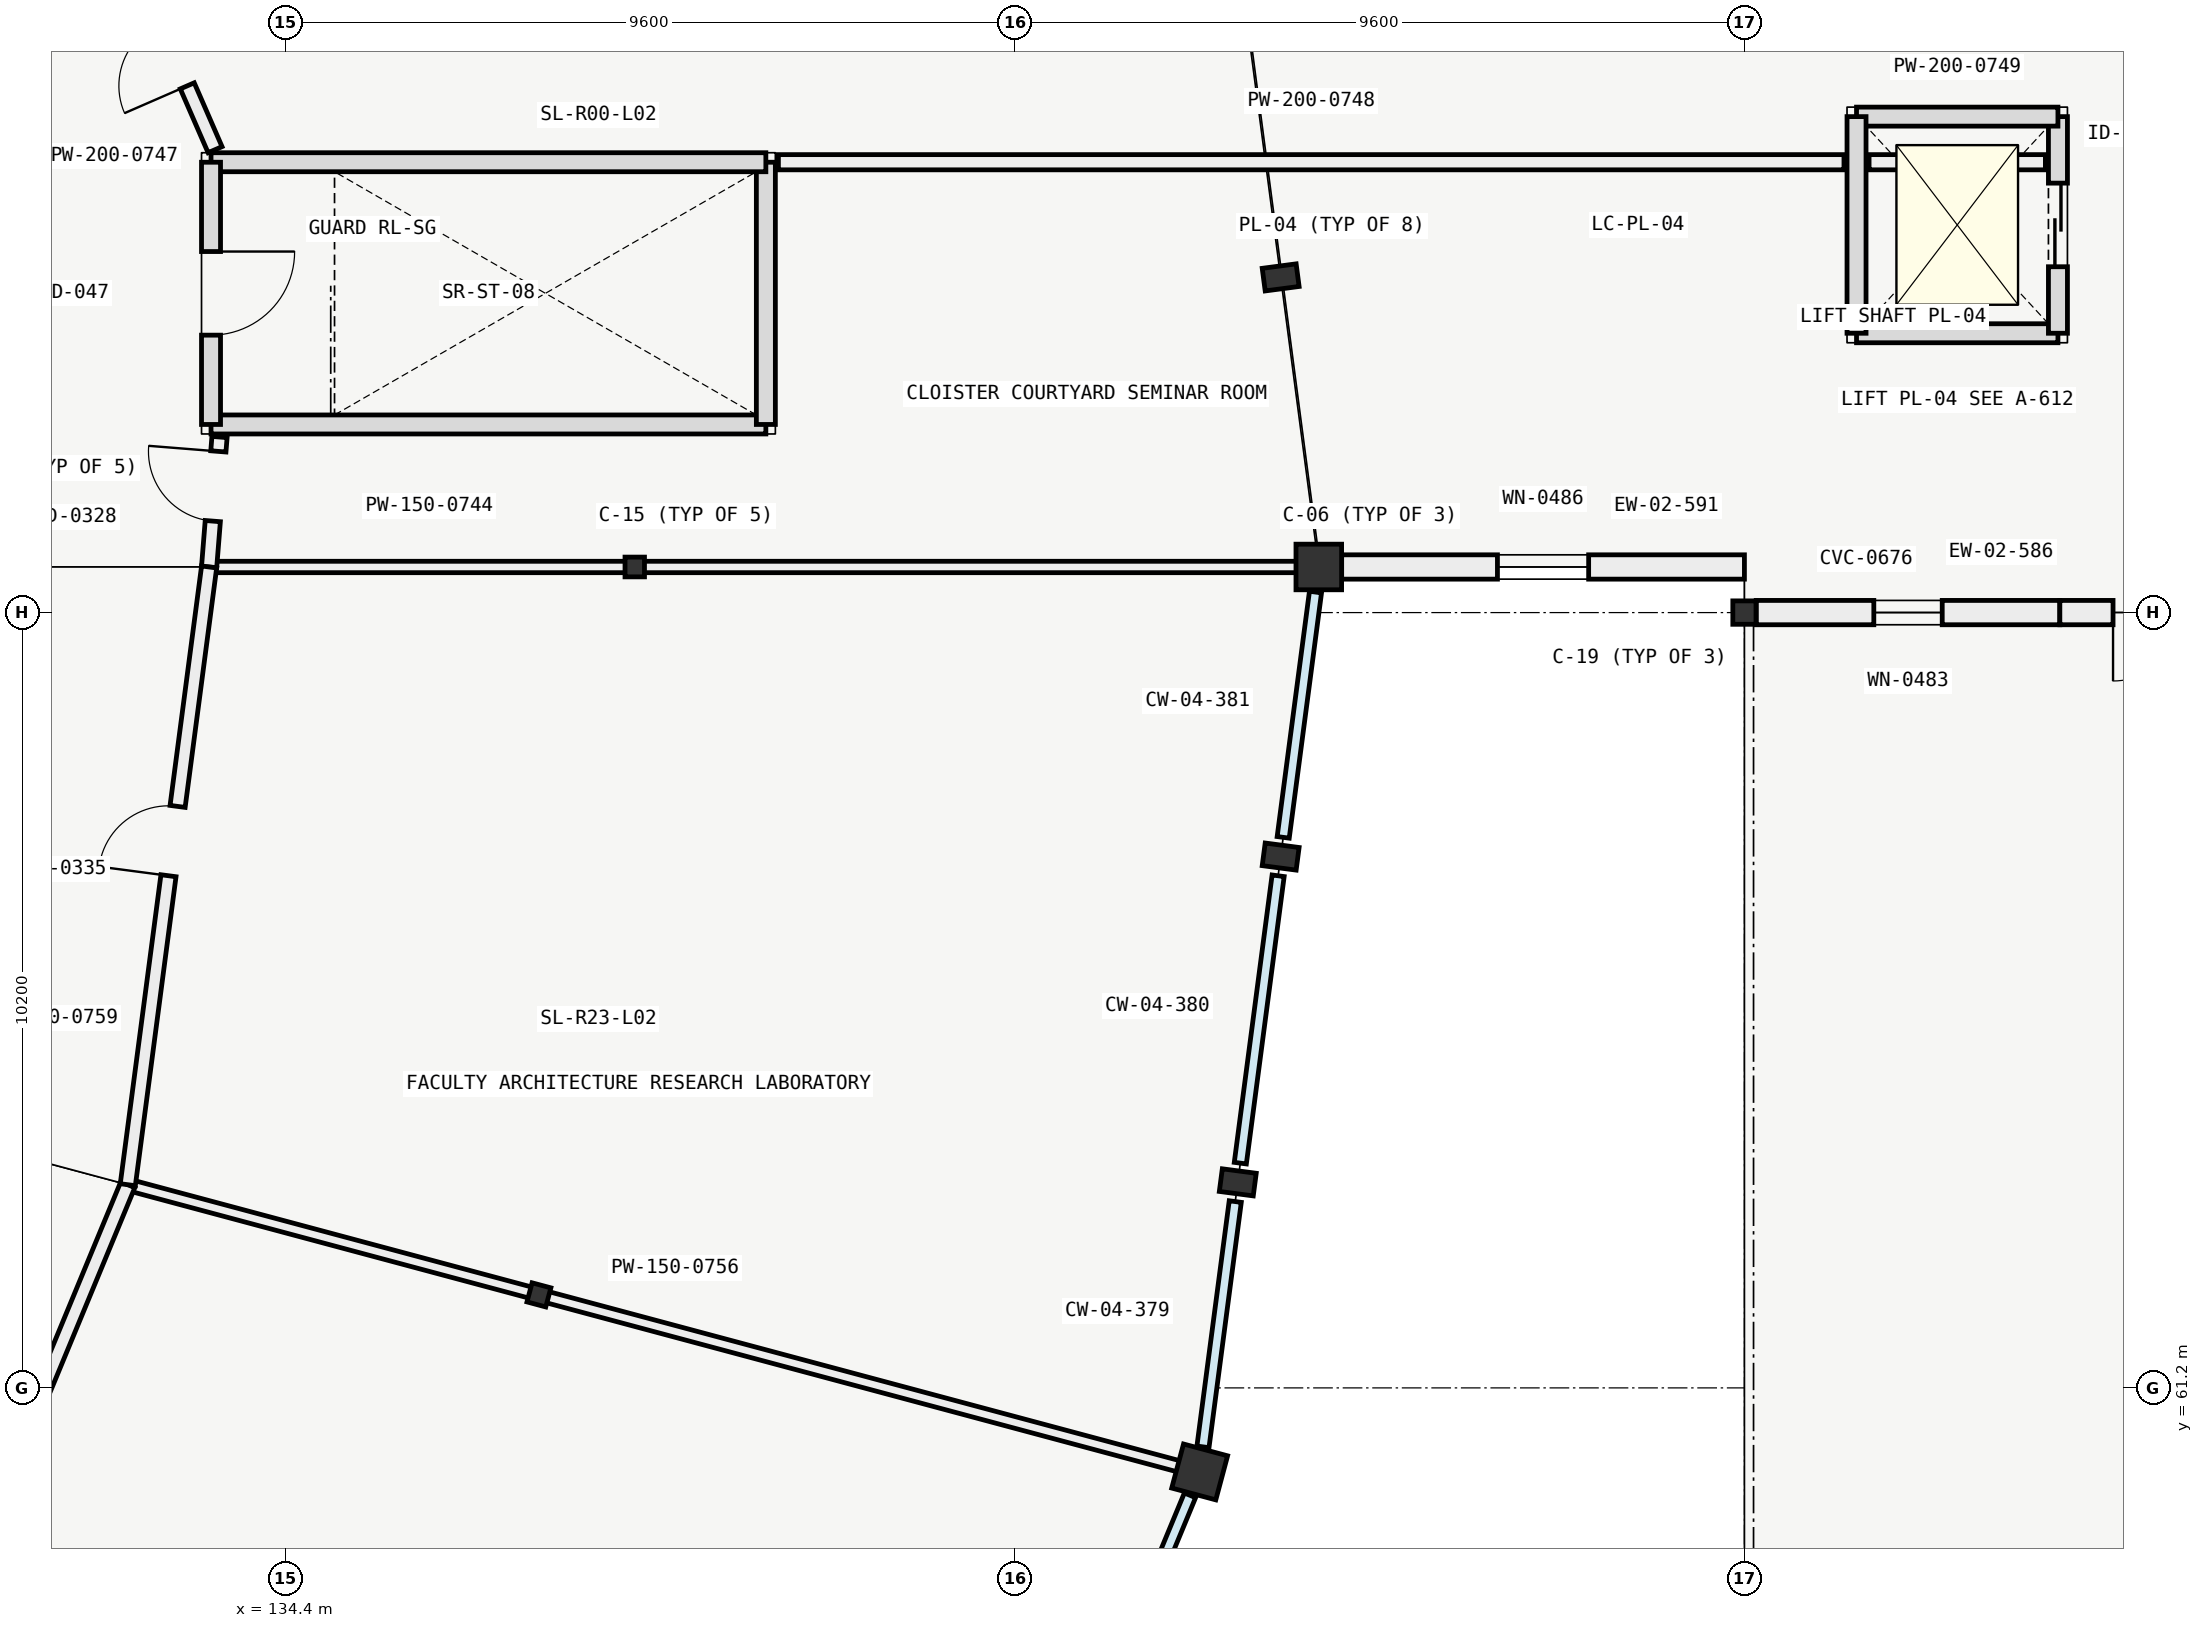
"""IFC4 building model, lengths in metres.
Left out: names, types, materials, properties, quantities, classifications, styles, units other than length and angle.
Written with IfcOpenShell. Run it as: python <this file> out.ifc"""

import sys

from ifc_helpers import new_model, si_unit, direction, frame, frame_2d, origin, origin_2d, place, context, subcontext, project, spatial, rectangle, i_section, extrude, element, fill, save


model = new_model("IFC4")
c1 = context("Model", 3, precision=1e-05, world=origin(), true_north=direction((0.0, 1.0)))
c2 = subcontext(c1, "Body", "Model", "MODEL_VIEW")
j1 = project(units=[si_unit("LENGTHUNIT", "METRE"), si_unit("PLANEANGLEUNIT", "RADIAN")], contexts=[c1])
p1 = place(None, origin())
s1 = spatial("IfcSite", under=j1, at=p1, CompositionType="ELEMENT")
p2 = place(p1, origin())
s2 = spatial("IfcBuilding", under=s1, at=p2, CompositionType="ELEMENT")
p3 = place(p2, frame((0.0, 0.0, 9.6)))
s3 = spatial("IfcBuildingStorey", under=s2, at=p3, CompositionType="ELEMENT", Elevation=9.6)
p4 = place(p3, frame((139.0, 72.0, 0.0), z_axis=(0.0, 0.0, 1.0), x_axis=(1.0, 0.0, 0.0)))
e1 = element("IfcColumn", 1, at=p4, inside=s3, PredefinedType="COLUMN", context=c2, shape_type="SweptSolid", body=[
    extrude(i_section(OverallWidth=0.256, OverallDepth=0.26, WebThickness=0.01, FlangeThickness=0.017, FilletRadius=0.014, at=origin_2d()), origin(), (0.0, 0.0, 1.0), 4.2),
])
p5 = place(p3, frame((148.0, 72.0, 0.0), z_axis=(0.0, 0.0, 1.0), x_axis=(1.0, 0.0, 0.0)))
e2 = element("IfcColumn", 2, at=p5, inside=s3, PredefinedType="COLUMN", context=c2, shape_type="SweptSolid", body=[
    extrude(rectangle(XDim=0.6, YDim=0.6, at=origin_2d()), origin(), (0.0, 0.0, 1.0), 4.2),
])
p6 = place(p3, frame((137.739, 62.424, 0.0), z_axis=(0.0, 0.0, 1.0), x_axis=(-0.965925826289, 0.258819045103, 0.0)))
e3 = element("IfcColumn", 3, at=p6, inside=s3, PredefinedType="COLUMN", context=c2, shape_type="SweptSolid", body=[
    extrude(i_section(OverallWidth=0.256, OverallDepth=0.26, WebThickness=0.01, FlangeThickness=0.017, FilletRadius=0.014, at=origin_2d()), origin(), (0.0, 0.0, 1.0), 4.2),
])
p7 = place(p3, frame((146.433, 60.094, 0.0), z_axis=(0.0, 0.0, 1.0), x_axis=(-0.965925826289, 0.258819045103, 0.0)))
e4 = element("IfcColumn", 4, at=p7, inside=s3, PredefinedType="COLUMN", context=c2, shape_type="SweptSolid", body=[
    extrude(rectangle(XDim=0.6, YDim=0.6, at=origin_2d()), origin(), (0.0, 0.0, 1.0), 4.2),
])
for number, where, z_axis, x_axis in (
    (5, (147.498, 75.81, 0.0), (0.0, 0.0, 1.0), (-0.131, 0.991, 0.0)),
    (6, (146.934, 63.904, 0.0), (0.0, 0.0, 1.0), (0.131, 0.991, 0.0)),
    (7, (147.498, 68.19, 0.0), (0.0, 0.0, 1.0), (0.131, 0.991, 0.0)),
):
    element("IfcColumn", number, at=place(p3, frame(where, z_axis=z_axis, x_axis=x_axis)), inside=s3, PredefinedType="PILASTER", context=c2, shape_type="SweptSolid", body=[
        extrude(rectangle(XDim=0.3, YDim=0.45, at=origin_2d()), origin(), (0.0, 0.0, 1.0), 7.651),
    ])
p8 = place(p3, frame((153.6, 71.4, 0.0), z_axis=(0.0, 0.0, 1.0), x_axis=(1.0, 0.0, 0.0)))
e8 = element("IfcColumn", 8, at=p8, inside=s3, PredefinedType="COLUMN", context=c2, shape_type="SweptSolid", body=[
    extrude(i_section(OverallWidth=0.305, OverallDepth=0.308, WebThickness=0.01, FlangeThickness=0.015, FilletRadius=0.017, at=origin_2d()), origin(), (0.0, 0.0, 1.0), 4.02),
])
p9 = place(p3, frame((157.75, 71.4, 0.0), z_axis=(0.0, 0.0, 1.0), x_axis=(-1.0, 0.0, 0.0)))
e9 = element("IfcWall", 9, at=p9, inside=s3, PredefinedType="SOLIDWALL", context=c2, shape_type="SweptSolid", body=[
    extrude(rectangle(XDim=3.995, YDim=0.32, at=frame_2d((1.998, 0.0))), origin(), (0.0, 0.0, 1.0), 3.821),
])
p10 = place(p9, frame((1.548, 0.0, 0.85)))
e10 = element("IfcOpeningElement", 10, at=p10, cuts=e9, PredefinedType="OPENING", context=c2, shape_type="SweptSolid", body=[
    extrude(rectangle(XDim=0.9, YDim=2.2, at=frame_2d((0.45, 1.1))), frame((0.0, 0.17, 0.0), z_axis=(0.0, -1.0, 0.0), x_axis=(1.0, 0.0, 0.0)), (0.0, 0.0, 1.0), 0.34),
])
p11 = place(p3, frame((160.95, 71.4, 0.0), z_axis=(0.0, 0.0, 1.0), x_axis=(-1.0, 0.0, 0.0)))
e11 = element("IfcWall", 11, at=p11, inside=s3, PredefinedType="SOLIDWALL", context=c2, shape_type="SweptSolid", body=[
    extrude(rectangle(XDim=3.2, YDim=0.32, at=frame_2d((1.6, 0.0))), origin(), (0.0, 0.0, 1.0), 3.821),
])
p12 = place(p11, frame((0.7, 0.0, 0.0)))
e12 = element("IfcOpeningElement", 12, at=p12, cuts=e11, PredefinedType="OPENING", context=c2, shape_type="SweptSolid", body=[
    extrude(rectangle(XDim=1.8, YDim=2.2, at=frame_2d((0.9, 1.1))), frame((0.0, 0.17, 0.0), z_axis=(0.0, -1.0, 0.0), x_axis=(1.0, 0.0, 0.0)), (0.0, 0.0, 1.0), 0.34),
])
p13 = place(p3, frame((153.6, 72.0, 0.0), z_axis=(0.0, 0.0, 1.0), x_axis=(-1.0, 0.0, 0.0)))
e13 = element("IfcWall", 13, at=p13, inside=s3, PredefinedType="SOLIDWALL", context=c2, shape_type="SweptSolid", body=[
    extrude(rectangle(XDim=5.299, YDim=0.32, at=frame_2d((2.649, 0.0))), origin(), (0.0, 0.0, 1.0), 3.821),
])
p14 = place(p13, frame((2.05, 0.0, 0.9)))
e14 = element("IfcOpeningElement", 14, at=p14, cuts=e13, PredefinedType="OPENING", context=c2, shape_type="SweptSolid", body=[
    extrude(rectangle(XDim=1.2, YDim=1.8, at=frame_2d((0.6, 0.9))), frame((0.0, 0.17, 0.0), z_axis=(0.0, -1.0, 0.0), x_axis=(1.0, 0.0, 0.0)), (0.0, 0.0, 1.0), 0.34),
])
p15 = place(p3, frame((133.425, 73.875, 0.0), z_axis=(0.0, 0.0, 1.0), x_axis=(1.0, 0.0, 0.0)))
e15 = element("IfcWall", 15, at=p15, inside=s3, PredefinedType="SOLIDWALL", context=c2, shape_type="SweptSolid", body=[
    extrude(rectangle(XDim=7.3, YDim=0.25, at=frame_2d((3.65, 0.0))), origin(), (0.0, 0.0, 1.0), 3.15),
])
p16 = place(p3, frame((140.725, 73.875, 0.0), z_axis=(0.0, 0.0, 1.0), x_axis=(0.0, 1.0, 0.0)))
e16 = element("IfcWall", 16, at=p16, inside=s3, PredefinedType="SOLIDWALL", context=c2, shape_type="SweptSolid", body=[
    extrude(rectangle(XDim=3.45, YDim=0.25, at=frame_2d((1.725, 0.0))), origin(), (0.0, 0.0, 1.0), 3.15),
])
p17 = place(p3, frame((140.725, 77.325, 0.0), z_axis=(0.0, 0.0, 1.0), x_axis=(-1.0, 0.0, 0.0)))
e17 = element("IfcWall", 17, at=p17, inside=s3, PredefinedType="SOLIDWALL", context=c2, shape_type="SweptSolid", body=[
    extrude(rectangle(XDim=7.3, YDim=0.25, at=frame_2d((3.65, 0.0))), origin(), (0.0, 0.0, 1.0), 3.15),
])
p18 = place(p3, frame((133.425, 77.325, 0.0), z_axis=(0.0, 0.0, 1.0), x_axis=(0.0, -1.0, 0.0)))
e18 = element("IfcWall", 18, at=p18, inside=s3, PredefinedType="SOLIDWALL", context=c2, shape_type="SweptSolid", body=[
    extrude(rectangle(XDim=3.45, YDim=0.25, at=frame_2d((1.725, 0.0))), origin(), (0.0, 0.0, 1.0), 3.15),
])
p19 = place(p18, frame((1.175, 0.0, 0.0)))
e19 = element("IfcOpeningElement", 19, at=p19, cuts=e18, PredefinedType="OPENING", context=c2, shape_type="SweptSolid", body=[
    extrude(rectangle(XDim=1.1, YDim=2.2, at=frame_2d((0.55, 1.1))), frame((0.0, 0.135, 0.0), z_axis=(0.0, -1.0, 0.0), x_axis=(1.0, 0.0, 0.0)), (0.0, 0.0, 1.0), 0.27),
])
p20 = place(p3, frame((155.075, 75.075, 0.0), z_axis=(0.0, 0.0, 1.0), x_axis=(1.0, 0.0, 0.0)))
e20 = element("IfcWall", 20, at=p20, inside=s3, PredefinedType="SOLIDWALL", context=c2, shape_type="SweptSolid", body=[
    extrude(rectangle(XDim=2.65, YDim=0.25, at=frame_2d((1.325, 0.0))), origin(), (0.0, 0.0, 1.0), 3.4),
])
p21 = place(p3, frame((157.725, 75.075, 0.0), z_axis=(0.0, 0.0, 1.0), x_axis=(0.0, 1.0, 0.0)))
e21 = element("IfcWall", 21, at=p21, inside=s3, PredefinedType="SOLIDWALL", context=c2, shape_type="SweptSolid", body=[
    extrude(rectangle(XDim=2.85, YDim=0.25, at=frame_2d((1.425, 0.0))), origin(), (0.0, 0.0, 1.0), 3.4),
])
p22 = place(p21, frame((0.875, 0.0, 0.0)))
e22 = element("IfcOpeningElement", 22, at=p22, cuts=e21, PredefinedType="OPENING", context=c2, shape_type="SweptSolid", body=[
    extrude(rectangle(XDim=1.1, YDim=2.1, at=frame_2d((0.55, 1.05))), frame((0.0, 0.135, 0.0), z_axis=(0.0, -1.0, 0.0), x_axis=(1.0, 0.0, 0.0)), (0.0, 0.0, 1.0), 0.27),
])
p23 = place(p3, frame((157.725, 77.925, 0.0), z_axis=(0.0, 0.0, 1.0), x_axis=(-1.0, 0.0, 0.0)))
e23 = element("IfcWall", 23, at=p23, inside=s3, PredefinedType="SOLIDWALL", context=c2, shape_type="SweptSolid", body=[
    extrude(rectangle(XDim=2.65, YDim=0.25, at=frame_2d((1.325, 0.0))), origin(), (0.0, 0.0, 1.0), 3.4),
])
p24 = place(p3, frame((155.075, 77.925, 0.0), z_axis=(0.0, 0.0, 1.0), x_axis=(0.0, -1.0, 0.0)))
e24 = element("IfcWall", 24, at=p24, inside=s3, PredefinedType="SOLIDWALL", context=c2, shape_type="SweptSolid", body=[
    extrude(rectangle(XDim=2.85, YDim=0.25, at=frame_2d((1.425, 0.0))), origin(), (0.0, 0.0, 1.0), 3.4),
])
p25 = place(p3, frame((133.4, 72.0, 0.0), z_axis=(0.0, 0.0, 1.0), x_axis=(1.0, 0.0, 0.0)))
e25 = element("IfcWall", 25, at=p25, inside=s3, PredefinedType="PARTITIONING", context=c2, shape_type="SweptSolid", body=[
    extrude(rectangle(XDim=14.48, YDim=0.15, at=frame_2d((7.24, 0.0))), origin(), (0.0, 0.0, 1.0), 3.777),
])
p26 = place(p3, frame((133.4, 72.0, 0.0), z_axis=(0.0, 0.0, 1.0), x_axis=(0.07984138391, 0.996807580938, 0.0)))
e26 = element("IfcWall", 26, at=p26, inside=s3, PredefinedType="PARTITIONING", context=c2, shape_type="SweptSolid", body=[
    extrude(rectangle(XDim=1.715, YDim=0.2, at=frame_2d((0.858, 0.0))), origin(), (0.0, 0.0, 1.0), 3.777),
])
p27 = place(p26, frame((0.605, 0.0, 0.0)))
e27 = element("IfcOpeningElement", 27, at=p27, cuts=e26, PredefinedType="OPENING", context=c2, shape_type="SweptSolid", body=[
    extrude(rectangle(XDim=0.92, YDim=2.1, at=frame_2d((0.46, 1.05))), frame((0.0, 0.11, 0.0), z_axis=(0.0, -1.0, 0.0), x_axis=(1.0, 0.0, 0.0)), (0.0, 0.0, 1.0), 0.22),
])
p28 = place(p3, frame((133.478, 77.49, 0.0), z_axis=(0.0, 0.0, 1.0), x_axis=(-0.399219580964, 0.916855346374, 0.0)))
e28 = element("IfcWall", 28, at=p28, inside=s3, PredefinedType="PARTITIONING", context=c2, shape_type="SweptSolid", body=[
    extrude(rectangle(XDim=2.876, YDim=0.2, at=frame_2d((1.438, 0.0))), origin(), (0.0, 0.0, 1.0), 3.777),
])
p29 = place(p28, frame((0.916, 0.0, 0.0)))
e29 = element("IfcOpeningElement", 29, at=p29, cuts=e28, PredefinedType="OPENING", context=c2, shape_type="SweptSolid", body=[
    extrude(rectangle(XDim=1.8, YDim=2.2, at=frame_2d((0.9, 1.1))), frame((0.0, 0.11, 0.0), z_axis=(0.0, -1.0, 0.0), x_axis=(1.0, 0.0, 0.0)), (0.0, 0.0, 1.0), 0.22),
])
p30 = place(p3, frame((140.89, 77.325, 0.0), z_axis=(0.0, 0.0, 1.0), x_axis=(1.0, 0.0, 0.0)))
e30 = element("IfcWall", 30, at=p30, inside=s3, PredefinedType="PARTITIONING", context=c2, shape_type="SweptSolid", body=[
    extrude(rectangle(XDim=14.02, YDim=0.2, at=frame_2d((7.01, 0.0))), origin(), (0.0, 0.0, 1.0), 3.821),
])
p31 = place(p3, frame((155.24, 77.325, 0.0), z_axis=(0.0, 0.0, 1.0), x_axis=(1.0, 0.0, 0.0)))
e31 = element("IfcWall", 31, at=p31, inside=s3, PredefinedType="PARTITIONING", context=c2, shape_type="SweptSolid", body=[
    extrude(rectangle(XDim=2.32, YDim=0.2, at=frame_2d((1.16, 0.0))), origin(), (0.0, 0.0, 1.0), 3.85),
])
p32 = place(p3, frame((132.33, 63.873, 0.0), z_axis=(0.0, 0.0, 1.0), x_axis=(0.965928107853, -0.258810530041, 0.0)))
e32 = element("IfcWall", 32, at=p32, inside=s3, PredefinedType="PARTITIONING", context=c2, shape_type="SweptSolid", body=[
    extrude(rectangle(XDim=14.48, YDim=0.15, at=frame_2d((7.24, 0.0))), origin(), (0.0, 0.0, 1.0), 3.777),
])
p33 = place(p3, frame((129.193, 56.3, 0.0), z_axis=(0.0, 0.0, 1.0), x_axis=(0.382696385238, 0.923874167149, 0.0)))
e33 = element("IfcWall", 33, at=p33, inside=s3, PredefinedType="PARTITIONING", context=c2, shape_type="SweptSolid", body=[
    extrude(rectangle(XDim=8.197, YDim=0.2, at=frame_2d((4.099, 0.0))), origin(), (0.0, 0.0, 1.0), 3.777),
])
p34 = place(p3, frame((132.33, 63.873, 0.0), z_axis=(0.0, 0.0, 1.0), x_axis=(0.130513066404, 0.991446589332, 0.0)))
e34 = element("IfcWall", 34, at=p34, inside=s3, PredefinedType="PARTITIONING", context=c2, shape_type="SweptSolid", body=[
    extrude(rectangle(XDim=8.197, YDim=0.2, at=frame_2d((4.099, 0.0))), origin(), (0.0, 0.0, 1.0), 3.777),
])
p35 = place(p34, frame((4.1, 0.0, 0.0)))
e35 = element("IfcOpeningElement", 35, at=p35, cuts=e34, PredefinedType="OPENING", context=c2, shape_type="SweptSolid", body=[
    extrude(rectangle(XDim=0.92, YDim=2.1, at=frame_2d((0.46, 1.05))), frame((0.0, 0.11, 0.0), z_axis=(0.0, -1.0, 0.0), x_axis=(1.0, 0.0, 0.0)), (0.0, 0.0, 1.0), 0.22),
])
p36 = place(p10, origin())
e36 = element("IfcWindow", 36, at=p36, inside=s3, PartitioningType="SINGLE_PANEL", PredefinedType="WINDOW", context=c2, shape_type="SweptSolid", body=[
    extrude(rectangle(XDim=0.9, YDim=2.2, at=frame_2d((0.45, 1.1))), frame((0.0, 0.03, 0.0), z_axis=(0.0, -1.0, 0.0), x_axis=(1.0, 0.0, 0.0)), (0.0, 0.0, 1.0), 0.06),
])
fill(e10, e36)
p37 = place(p12, origin())
e37 = element("IfcDoor", 37, at=p37, inside=s3, OperationType="DOUBLE_DOOR_SINGLE_SWING", PredefinedType="DOOR", context=c2, shape_type="SweptSolid", body=[
    extrude(rectangle(XDim=1.8, YDim=2.2, at=frame_2d((0.9, 1.1))), frame((0.0, 0.025, 0.0), z_axis=(0.0, -1.0, 0.0), x_axis=(1.0, 0.0, 0.0)), (0.0, 0.0, 1.0), 0.05),
])
fill(e12, e37)
p38 = place(p14, origin())
e38 = element("IfcWindow", 38, at=p38, inside=s3, PartitioningType="SINGLE_PANEL", PredefinedType="WINDOW", context=c2, shape_type="SweptSolid", body=[
    extrude(rectangle(XDim=1.2, YDim=1.8, at=frame_2d((0.6, 0.9))), frame((0.0, 0.03, 0.0), z_axis=(0.0, -1.0, 0.0), x_axis=(1.0, 0.0, 0.0)), (0.0, 0.0, 1.0), 0.06),
])
fill(e14, e38)
p39 = place(p19, origin())
e39 = element("IfcDoor", 39, at=p39, inside=s3, OperationType="SINGLE_SWING_LEFT", PredefinedType="DOOR", context=c2, shape_type="SweptSolid", body=[
    extrude(rectangle(XDim=1.1, YDim=2.2, at=frame_2d((0.55, 1.1))), frame((0.0, 0.025, 0.0), z_axis=(0.0, -1.0, 0.0), x_axis=(1.0, 0.0, 0.0)), (0.0, 0.0, 1.0), 0.05),
])
fill(e19, e39)
p40 = place(p22, origin())
e40 = element("IfcDoor", 40, at=p40, inside=s3, OperationType="SLIDING_TO_LEFT", PredefinedType="DOOR", context=c2, shape_type="SweptSolid", body=[
    extrude(rectangle(XDim=1.1, YDim=2.1, at=frame_2d((0.55, 1.05))), frame((0.0, 0.025, 0.0), z_axis=(0.0, -1.0, 0.0), x_axis=(1.0, 0.0, 0.0)), (0.0, 0.0, 1.0), 0.05),
])
fill(e22, e40)
p41 = place(p27, origin())
e41 = element("IfcDoor", 41, at=p41, inside=s3, OperationType="SINGLE_SWING_RIGHT", PredefinedType="DOOR", context=c2, shape_type="SweptSolid", body=[
    extrude(rectangle(XDim=0.92, YDim=2.1, at=frame_2d((0.46, 1.05))), frame((0.0, 0.025, 0.0), z_axis=(0.0, -1.0, 0.0), x_axis=(1.0, 0.0, 0.0)), (0.0, 0.0, 1.0), 0.05),
])
fill(e27, e41)
p42 = place(p29, origin())
e42 = element("IfcDoor", 42, at=p42, inside=s3, OperationType="DOUBLE_DOOR_SINGLE_SWING", PredefinedType="DOOR", context=c2, shape_type="SweptSolid", body=[
    extrude(rectangle(XDim=1.8, YDim=2.2, at=frame_2d((0.9, 1.1))), frame((0.0, 0.025, 0.0), z_axis=(0.0, -1.0, 0.0), x_axis=(1.0, 0.0, 0.0)), (0.0, 0.0, 1.0), 0.05),
])
fill(e29, e42)
p43 = place(p35, origin())
e43 = element("IfcDoor", 43, at=p43, inside=s3, OperationType="SINGLE_SWING_LEFT", PredefinedType="DOOR", context=c2, shape_type="SweptSolid", body=[
    extrude(rectangle(XDim=0.92, YDim=2.1, at=frame_2d((0.46, 1.05))), frame((0.0, 0.025, 0.0), z_axis=(0.0, -1.0, 0.0), x_axis=(1.0, 0.0, 0.0)), (0.0, 0.0, 1.0), 0.05),
])
fill(e35, e43)
save(model, sys.argv[1])
